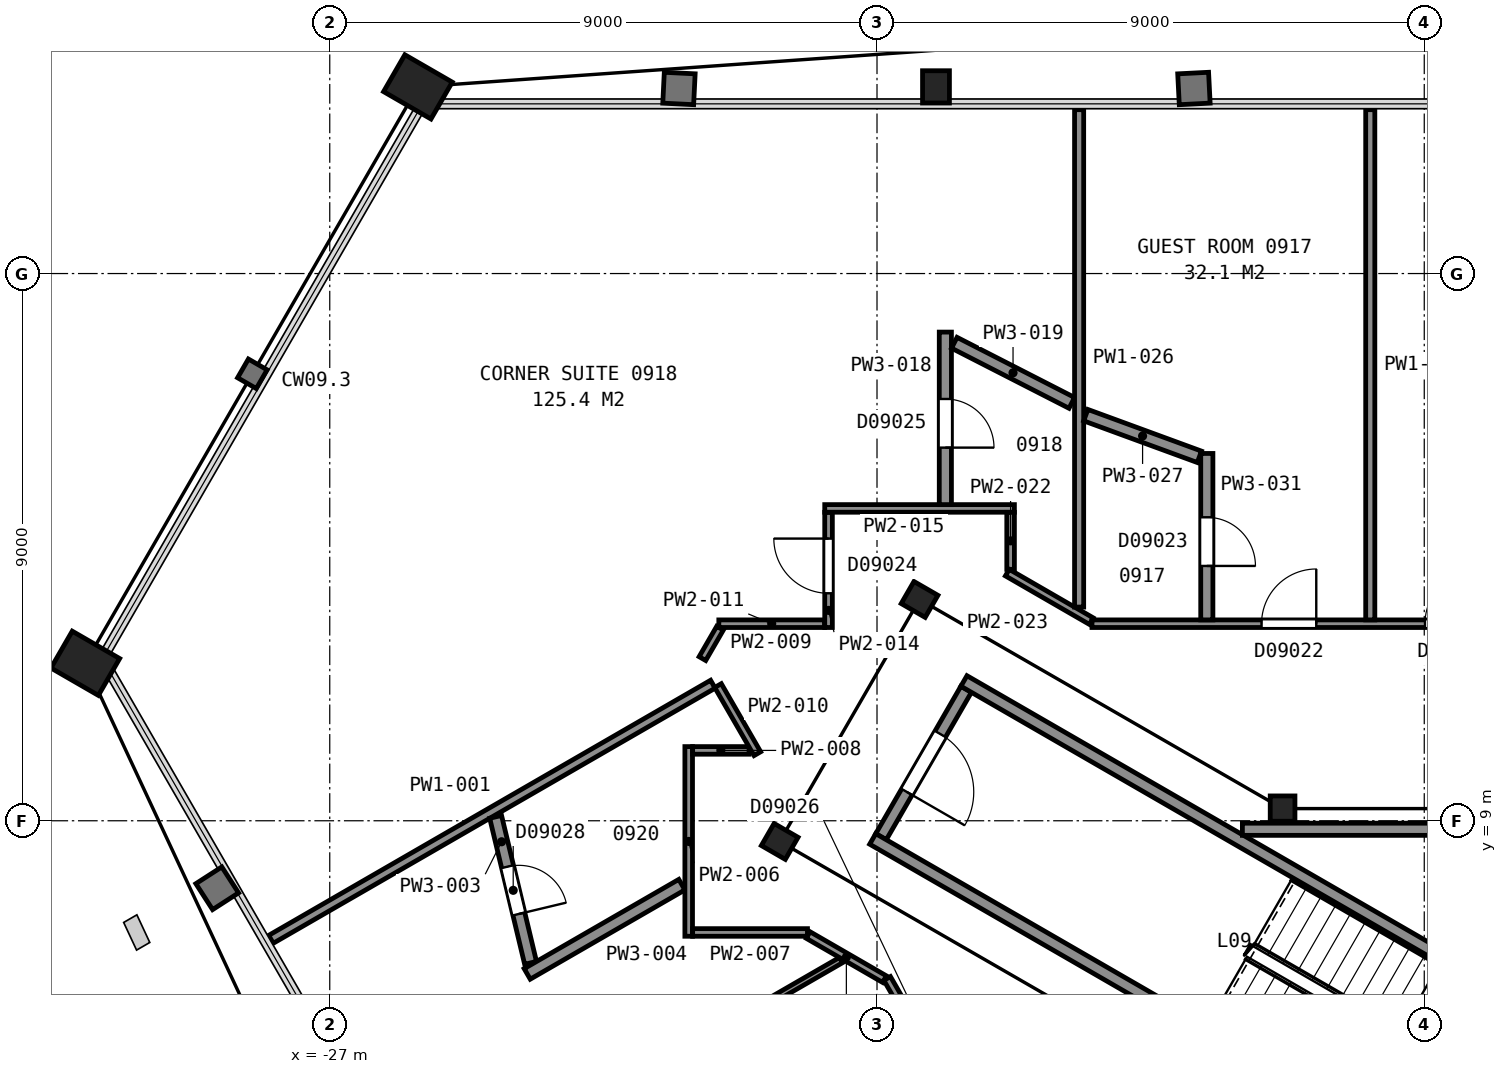
"""IFC4 building model, lengths in metres.
Left out: names, types, materials, properties, quantities, classifications, styles, units other than length and angle.
Written with IfcOpenShell. Run it as: python <this file> out.ifc"""

import sys

from ifc_helpers import new_model, si_unit, direction, frame, frame_2d, origin, origin_2d, place, context, subcontext, project, spatial, rectangle, hollow_rectangle, i_section, extrude, element, fill, save


model = new_model("IFC4")
c1 = context("Model", 3, precision=1e-05, world=origin(), true_north=direction((0.0, 1.0)))
c2 = subcontext(c1, "Body", "Model", "MODEL_VIEW")
j1 = project(units=[si_unit("LENGTHUNIT", "METRE"), si_unit("PLANEANGLEUNIT", "RADIAN")], contexts=[c1])
p1 = place(None, origin())
s1 = spatial("IfcSite", under=j1, at=p1, CompositionType="ELEMENT")
p2 = place(p1, origin())
s2 = spatial("IfcBuilding", under=s1, at=p2, CompositionType="ELEMENT")
p3 = place(p2, frame((0.0, 0.0, 47.6)))
s3 = spatial("IfcBuildingStorey", under=s2, at=p3, CompositionType="ELEMENT", Elevation=47.6)
p4 = place(p3, frame((-17.03, 21.07, 0.025), z_axis=(0.0, 0.0, 1.0), x_axis=(1.0, 0.0, 0.0)))
e1 = element("IfcColumn", 1, at=p4, inside=s3, PredefinedType="COLUMN", context=c2, shape_type="SweptSolid", body=[
    extrude(i_section(OverallWidth=0.442, OverallDepth=0.531, WebThickness=0.066, FlangeThickness=0.106, FilletRadius=0.015, at=origin_2d()), origin(), (0.0, 0.0, 1.0), 3.575),
])
for number, where, z_axis, x_axis in (
    (2, (-25.55, 21.07, 0.04), (0.0, 0.0, 1.0), (0.5, 0.866, 0.0)),
    (3, (-31.02, 11.59, 0.04), (0.0, 0.0, 1.0), (0.5, 0.866, 0.0)),
):
    element("IfcColumn", number, at=place(p3, frame(where, z_axis=z_axis, x_axis=x_axis)), inside=s3, PredefinedType="COLUMN", context=c2, shape_type="SweptSolid", body=[
        extrude(hollow_rectangle(XDim=0.7, YDim=0.9, WallThickness=0.065, at=origin_2d()), origin(), (0.0, 0.0, 1.0), 3.56),
    ])
p5 = place(p3, frame((-11.33, 9.2, 0.0), z_axis=(0.0, 0.0, 1.0), x_axis=(1.0, 0.0, 0.0)))
e4 = element("IfcColumn", 4, at=p5, inside=s3, PredefinedType="COLUMN", context=c2, shape_type="SweptSolid", body=[
    extrude(i_section(OverallWidth=0.406, OverallDepth=0.417, WebThickness=0.03, FlangeThickness=0.048, FilletRadius=0.015, at=origin_2d()), origin(), (0.0, 0.0, 1.0), 3.6),
])
for number, where, z_axis, x_axis in (
    (5, (-17.3, 12.64, 0.0), (0.0, 0.0, 1.0), (0.5, 0.866, 0.0)),
    (6, (-19.6, 8.66, 0.0), (0.0, 0.0, 1.0), (0.5, 0.866, 0.0)),
):
    element("IfcColumn", number, at=place(p3, frame(where, z_axis=z_axis, x_axis=x_axis)), inside=s3, PredefinedType="COLUMN", context=c2, shape_type="SweptSolid", body=[
        extrude(i_section(OverallWidth=0.419, OverallDepth=0.455, WebThickness=0.042, FlangeThickness=0.068, FilletRadius=0.015, at=origin_2d()), origin(), (0.0, 0.0, 1.0), 3.6),
    ])
p6 = place(p3, frame((-16.534, 11.162, 0.0), z_axis=(0.0, 0.0, 1.0), x_axis=(-0.49998411664, -0.866034573852, 0.0)))
e7 = element("IfcWall", 7, at=p6, inside=s3, PredefinedType="PARTITIONING", context=c2, shape_type="SweptSolid", body=[
    extrude(rectangle(XDim=2.8, YDim=0.2, at=frame_2d((1.4, 0.0))), origin(), (0.0, 0.0, 1.0), 3.35),
])
p7 = place(p6, frame((0.85, 0.0, 0.0)))
e8 = element("IfcOpeningElement", 8, at=p7, cuts=e7, PredefinedType="OPENING", context=c2, shape_type="SweptSolid", body=[
    extrude(rectangle(XDim=1.1, YDim=2.1, at=frame_2d((0.55, 1.05))), frame((0.0, 0.11, 0.0), z_axis=(0.0, -1.0, 0.0), x_axis=(1.0, 0.0, 0.0)), (0.0, 0.0, 1.0), 0.22),
])
for number, where, z_axis, x_axis in (
    (9, (-7.678, 2.701, 0.0), (0.0, 0.0, 1.0), (-0.866, 0.5, 0.0)),
    (10, (-6.178, 5.299, 0.0), (0.0, 0.0, 1.0), (-0.866, 0.5, 0.0)),
):
    element("IfcWall", number, at=place(p3, frame(where, z_axis=z_axis, x_axis=x_axis)), inside=s3, PredefinedType="PARTITIONING", context=c2, shape_type="SweptSolid", body=[
        extrude(rectangle(XDim=12.0, YDim=0.2, at=frame_2d((6.0, 0.0))), origin(), (0.0, 0.0, 1.0), 3.35),
    ])
p8 = place(p3, frame((0.263, 8.86, 0.0), z_axis=(0.0, 0.0, 1.0), x_axis=(-1.0, 0.0, 0.0)))
e11 = element("IfcWall", 11, at=p8, inside=s3, PredefinedType="PARTITIONING", context=c2, shape_type="SweptSolid", body=[
    extrude(rectangle(XDim=12.254, YDim=0.2, at=frame_2d((6.127, 0.0))), origin(), (0.0, 0.0, 1.0), 3.35),
])
p9 = place(p8, frame((5.709, 0.0, 0.0)))
e12 = element("IfcOpeningElement", 12, at=p9, cuts=e11, PredefinedType="OPENING", context=c2, shape_type="SweptSolid", body=[
    extrude(rectangle(XDim=1.8, YDim=2.1, at=frame_2d((0.9, 1.05))), frame((0.0, 0.11, 0.0), z_axis=(0.0, -1.0, 0.0), x_axis=(1.0, 0.0, 0.0)), (0.0, 0.0, 1.0), 0.22),
])
p10 = place(p3, frame((-27.967, 7.05, 0.0), z_axis=(0.0, 0.0, 1.0), x_axis=(0.86603249375, 0.499987719618, 0.0)))
e13 = element("IfcWall", 13, at=p10, inside=s3, PredefinedType="PARTITIONING", context=c2, shape_type="SweptSolid", body=[
    extrude(rectangle(XDim=8.392, YDim=0.15, at=frame_2d((4.196, 0.0))), origin(), (0.0, 0.0, 1.0), 2.613),
])
p11 = place(p3, frame((-25.476, 2.735, 0.0), z_axis=(0.0, 0.0, 1.0), x_axis=(0.866077639848, 0.499909513568, 0.0)))
e14 = element("IfcWall", 14, at=p11, inside=s3, PredefinedType="PARTITIONING", context=c2, shape_type="SweptSolid", body=[
    extrude(rectangle(XDim=7.946, YDim=0.1, at=frame_2d((3.973, 0.0))), origin(), (0.0, 0.0, 1.0), 2.613),
])
p12 = place(p11, frame((3.604, 0.0, 0.0)))
e15 = element("IfcOpeningElement", 15, at=p12, cuts=e14, PredefinedType="OPENING", context=c2, shape_type="SweptSolid", body=[
    extrude(rectangle(XDim=0.9, YDim=2.1, at=frame_2d((0.45, 1.05))), frame((0.0, 0.06, 0.0), z_axis=(0.0, -1.0, 0.0), x_axis=(1.0, 0.0, 0.0)), (0.0, 0.0, 1.0), 0.12),
])
p13 = place(p3, frame((-24.272, 9.064, 0.0), z_axis=(0.0, 0.0, 1.0), x_axis=(0.232636237171, -0.972563818551, 0.0)))
e16 = element("IfcWall", 16, at=p13, inside=s3, PredefinedType="PARTITIONING", context=c2, shape_type="SweptSolid", body=[
    extrude(rectangle(XDim=2.469, YDim=0.2, at=frame_2d((1.235, 0.0))), origin(), (0.0, 0.0, 1.0), 2.613),
])
p14 = place(p13, frame((0.842, 0.0, 0.0)))
e17 = element("IfcOpeningElement", 17, at=p14, cuts=e16, PredefinedType="OPENING", context=c2, shape_type="SweptSolid", body=[
    extrude(rectangle(XDim=0.8, YDim=2.1, at=frame_2d((0.4, 1.05))), frame((0.0, 0.11, 0.0), z_axis=(0.0, -1.0, 0.0), x_axis=(1.0, 0.0, 0.0)), (0.0, 0.0, 1.0), 0.22),
])
p15 = place(p3, frame((-23.753, 6.481, 0.0), z_axis=(0.0, 0.0, 1.0), x_axis=(0.866070680301, 0.499921570572, 0.0)))
e18 = element("IfcWall", 18, at=p15, inside=s3, PredefinedType="PARTITIONING", context=c2, shape_type="SweptSolid", body=[
    extrude(rectangle(XDim=2.937, YDim=0.2, at=frame_2d((1.468, 0.0))), origin(), (0.0, 0.0, 1.0), 2.613),
])
p16 = place(p3, frame((-21.097, 7.101, 0.0), z_axis=(0.0, 0.0, 1.0), x_axis=(0.0, 1.0, 0.0)))
e19 = element("IfcWall", 19, at=p16, inside=s3, PredefinedType="PARTITIONING", context=c2, shape_type="SweptSolid", body=[
    extrude(rectangle(XDim=3.119, YDim=0.125, at=frame_2d((1.56, 0.0))), origin(), (0.0, 0.0, 1.0), 2.613),
])
p17 = place(p3, frame((-21.032, 7.163, 0.0), z_axis=(0.0, 0.0, 1.0), x_axis=(1.0, 0.0, 0.0)))
e20 = element("IfcWall", 20, at=p17, inside=s3, PredefinedType="PARTITIONING", context=c2, shape_type="SweptSolid", body=[
    extrude(rectangle(XDim=1.888, YDim=0.125, at=frame_2d((0.944, 0.0))), origin(), (0.0, 0.0, 1.0), 2.613),
])
p18 = place(p3, frame((-21.032, 10.157, 0.0), z_axis=(0.0, 0.0, 1.0), x_axis=(1.0, 0.0, 0.0)))
e21 = element("IfcWall", 21, at=p18, inside=s3, PredefinedType="PARTITIONING", context=c2, shape_type="SweptSolid", body=[
    extrude(rectangle(XDim=0.928, YDim=0.125, at=frame_2d((0.464, 0.0))), origin(), (0.0, 0.0, 1.0), 2.613),
])
p19 = place(p3, frame((-20.871, 11.667, 0.0), z_axis=(0.0, 0.0, 1.0), x_axis=(0.500769941337, 0.865580421367, 0.0)))
e22 = element("IfcWall", 22, at=p19, inside=s3, PredefinedType="PARTITIONING", context=c2, shape_type="SweptSolid", body=[
    extrude(rectangle(XDim=0.578, YDim=0.125, at=frame_2d((0.289, 0.0))), origin(), (0.0, 0.0, 1.0), 2.613),
])
p20 = place(p3, frame((-20.615, 11.223, 0.0), z_axis=(0.0, 0.0, 1.0), x_axis=(0.500076370288, -0.865981306888, 0.0)))
e23 = element("IfcWall", 23, at=p20, inside=s3, PredefinedType="PARTITIONING", context=c2, shape_type="SweptSolid", body=[
    extrude(rectangle(XDim=1.294, YDim=0.125, at=frame_2d((0.647, 0.0))), origin(), (0.0, 0.0, 1.0), 2.613),
])
p21 = place(p3, frame((-20.602, 12.241, 0.0), z_axis=(0.0, 0.0, 1.0), x_axis=(1.0, 0.0, 0.0)))
e24 = element("IfcWall", 24, at=p21, inside=s3, PredefinedType="PARTITIONING", context=c2, shape_type="SweptSolid", body=[
    extrude(rectangle(XDim=1.74, YDim=0.125, at=frame_2d((0.87, 0.0))), origin(), (0.0, 0.0, 1.0), 2.613),
])
p22 = place(p3, frame((-19.132, 7.121, 0.0), z_axis=(0.0, 0.0, 1.0), x_axis=(0.865894215669, -0.500227155672, 0.0)))
e25 = element("IfcWall", 25, at=p22, inside=s3, PredefinedType="PARTITIONING", context=c2, shape_type="SweptSolid", body=[
    extrude(rectangle(XDim=1.451, YDim=0.125, at=frame_2d((0.726, 0.0))), origin(), (0.0, 0.0, 1.0), 2.613),
])
p23 = place(p3, frame((-18.797, 12.178, 0.0), z_axis=(0.0, 0.0, 1.0), x_axis=(0.0, 1.0, 0.0)))
e26 = element("IfcWall", 26, at=p23, inside=s3, PredefinedType="PARTITIONING", context=c2, shape_type="SweptSolid", body=[
    extrude(rectangle(XDim=1.894, YDim=0.125, at=frame_2d((0.947, 0.0))), origin(), (0.0, 0.0, 1.0), 2.613),
])
p24 = place(p23, frame((0.562, 0.0, 0.0)))
e27 = element("IfcOpeningElement", 27, at=p24, cuts=e26, PredefinedType="OPENING", context=c2, shape_type="SweptSolid", body=[
    extrude(rectangle(XDim=0.9, YDim=2.1, at=frame_2d((0.45, 1.05))), frame((0.0, 0.073, 0.0), z_axis=(0.0, -1.0, 0.0), x_axis=(1.0, 0.0, 0.0)), (0.0, 0.0, 1.0), 0.145),
])
p25 = place(p3, frame((-18.86, 14.137, 0.0), z_axis=(0.0, 0.0, 1.0), x_axis=(1.0, 0.0, 0.0)))
e28 = element("IfcWall", 28, at=p25, inside=s3, PredefinedType="PARTITIONING", context=c2, shape_type="SweptSolid", body=[
    extrude(rectangle(XDim=3.119, YDim=0.125, at=frame_2d((1.56, 0.0))), origin(), (0.0, 0.0, 1.0), 2.613),
])
p26 = place(p3, frame((-3.766, -17.959, 0.0), z_axis=(0.0, 0.0, 1.0), x_axis=(-0.500002884005, 0.866023738697, 0.0)))
e29 = element("IfcWall", 29, at=p26, inside=s3, PredefinedType="PARTITIONING", context=c2, shape_type="SweptSolid", body=[
    extrude(rectangle(XDim=28.135, YDim=0.125, at=frame_2d((14.067, 0.0))), origin(), (0.0, 0.0, 1.0), 2.613),
])
p27 = place(p26, frame((25.422, 0.0, 0.0)))
e30 = element("IfcOpeningElement", 30, at=p27, cuts=e29, PredefinedType="OPENING", context=c2, shape_type="SweptSolid", body=[
    extrude(rectangle(XDim=1.0, YDim=2.1, at=frame_2d((0.5, 1.05))), frame((0.0, 0.073, 0.0), z_axis=(0.0, -1.0, 0.0), x_axis=(1.0, 0.0, 0.0)), (0.0, 0.0, 1.0), 0.145),
])
p28 = place(p26, frame((21.693, 0.0, 0.0)))
e31 = element("IfcOpeningElement", 31, at=p28, cuts=e29, PredefinedType="OPENING", context=c2, shape_type="SweptSolid", body=[
    extrude(rectangle(XDim=0.9, YDim=2.1, at=frame_2d((0.45, 1.05))), frame((0.0, 0.073, 0.0), z_axis=(0.0, -1.0, 0.0), x_axis=(1.0, 0.0, 0.0)), (0.0, 0.0, 1.0), 0.145),
])
p29 = place(p26, frame((14.438, 0.0, 0.0)))
e32 = element("IfcOpeningElement", 32, at=p29, cuts=e29, PredefinedType="OPENING", context=c2, shape_type="SweptSolid", body=[
    extrude(rectangle(XDim=0.9, YDim=2.1, at=frame_2d((0.45, 1.05))), frame((0.0, 0.073, 0.0), z_axis=(0.0, -1.0, 0.0), x_axis=(1.0, 0.0, 0.0)), (0.0, 0.0, 1.0), 0.145),
])
p30 = place(p26, frame((11.712, 0.0, 0.0)))
e33 = element("IfcOpeningElement", 33, at=p30, cuts=e29, PredefinedType="OPENING", context=c2, shape_type="SweptSolid", body=[
    extrude(rectangle(XDim=0.9, YDim=2.1, at=frame_2d((0.45, 1.05))), frame((0.0, 0.073, 0.0), z_axis=(0.0, -1.0, 0.0), x_axis=(1.0, 0.0, 0.0)), (0.0, 0.0, 1.0), 0.145),
])
p31 = place(p26, frame((4.787, 0.0, 0.0)))
e34 = element("IfcOpeningElement", 34, at=p31, cuts=e29, PredefinedType="OPENING", context=c2, shape_type="SweptSolid", body=[
    extrude(rectangle(XDim=0.9, YDim=2.1, at=frame_2d((0.45, 1.05))), frame((0.0, 0.073, 0.0), z_axis=(0.0, -1.0, 0.0), x_axis=(1.0, 0.0, 0.0)), (0.0, 0.0, 1.0), 0.145),
])
p32 = place(p26, frame((1.762, 0.0, 0.0)))
e35 = element("IfcOpeningElement", 35, at=p32, cuts=e29, PredefinedType="OPENING", context=c2, shape_type="SweptSolid", body=[
    extrude(rectangle(XDim=0.9, YDim=2.1, at=frame_2d((0.45, 1.05))), frame((0.0, 0.073, 0.0), z_axis=(0.0, -1.0, 0.0), x_axis=(1.0, 0.0, 0.0)), (0.0, 0.0, 1.0), 0.145),
])
p33 = place(p3, frame((-16.876, 17.037, 0.0), z_axis=(0.0, 0.0, 1.0), x_axis=(0.0, -1.0, 0.0)))
e36 = element("IfcWall", 36, at=p33, inside=s3, PredefinedType="PARTITIONING", context=c2, shape_type="SweptSolid", body=[
    extrude(rectangle(XDim=2.838, YDim=0.2, at=frame_2d((1.419, 0.0))), origin(), (0.0, 0.0, 1.0), 2.613),
])
p34 = place(p33, frame((1.1, 0.0, 0.0)))
e37 = element("IfcOpeningElement", 37, at=p34, cuts=e36, PredefinedType="OPENING", context=c2, shape_type="SweptSolid", body=[
    extrude(rectangle(XDim=0.8, YDim=2.1, at=frame_2d((0.4, 1.05))), frame((0.0, 0.11, 0.0), z_axis=(0.0, -1.0, 0.0), x_axis=(1.0, 0.0, 0.0)), (0.0, 0.0, 1.0), 0.22),
])
p35 = place(p3, frame((-16.729, 16.862, 0.0), z_axis=(0.0, 0.0, 1.0), x_axis=(0.890181338078, -0.455606392995, 0.0)))
e38 = element("IfcWall", 38, at=p35, inside=s3, PredefinedType="PARTITIONING", context=c2, shape_type="SweptSolid", body=[
    extrude(rectangle(XDim=2.171, YDim=0.2, at=frame_2d((1.085, 0.0))), origin(), (0.0, 0.0, 1.0), 2.613),
])
p36 = place(p3, frame((-15.803, 13.135, 0.0), z_axis=(0.0, 0.0, 1.0), x_axis=(0.0, 1.0, 0.0)))
e39 = element("IfcWall", 39, at=p36, inside=s3, PredefinedType="PARTITIONING", context=c2, shape_type="SweptSolid", body=[
    extrude(rectangle(XDim=0.937, YDim=0.125, at=frame_2d((0.469, 0.0))), origin(), (0.0, 0.0, 1.0), 2.613),
])
p37 = place(p3, frame((-15.857, 13.081, 0.0), z_axis=(0.0, 0.0, 1.0), x_axis=(0.865974057503, -0.500088923824, 0.0)))
e40 = element("IfcWall", 40, at=p37, inside=s3, PredefinedType="PARTITIONING", context=c2, shape_type="SweptSolid", body=[
    extrude(rectangle(XDim=1.595, YDim=0.125, at=frame_2d((0.798, 0.0))), origin(), (0.0, 0.0, 1.0), 2.613),
])
p38 = place(p3, frame((-14.676, 12.514, 0.0), z_axis=(0.0, 0.0, 1.0), x_axis=(0.0, 1.0, 0.0)))
e41 = element("IfcWall", 41, at=p38, inside=s3, PredefinedType="PARTITIONING", context=c2, shape_type="SweptSolid", body=[
    extrude(rectangle(XDim=8.181, YDim=0.15, at=frame_2d((4.09, 0.0))), origin(), (0.0, 0.0, 1.0), 2.613),
])
p39 = place(p3, frame((-14.567, 15.671, 0.0), z_axis=(0.0, 0.0, 1.0), x_axis=(0.938894816734, -0.344204188105, 0.0)))
e42 = element("IfcWall", 42, at=p39, inside=s3, PredefinedType="PARTITIONING", context=c2, shape_type="SweptSolid", body=[
    extrude(rectangle(XDim=1.99, YDim=0.2, at=frame_2d((0.995, 0.0))), origin(), (0.0, 0.0, 1.0), 2.613),
])
p40 = place(p3, frame((-14.465, 12.241, 0.0), z_axis=(0.0, 0.0, 1.0), x_axis=(1.0, 0.0, 0.0)))
e43 = element("IfcWall", 43, at=p40, inside=s3, PredefinedType="PARTITIONING", context=c2, shape_type="SweptSolid", body=[
    extrude(rectangle(XDim=28.929, YDim=0.125, at=frame_2d((14.465, 0.0))), origin(), (0.0, 0.0, 1.0), 2.613),
])
p41 = place(p40, frame((25.252, 0.0, 0.0)))
e44 = element("IfcOpeningElement", 44, at=p41, cuts=e43, PredefinedType="OPENING", context=c2, shape_type="SweptSolid", body=[
    extrude(rectangle(XDim=0.9, YDim=2.1, at=frame_2d((0.45, 1.05))), frame((0.0, 0.073, 0.0), z_axis=(0.0, -1.0, 0.0), x_axis=(1.0, 0.0, 0.0)), (0.0, 0.0, 1.0), 0.145),
])
p42 = place(p40, frame((22.564, 0.0, 0.0)))
e45 = element("IfcOpeningElement", 45, at=p42, cuts=e43, PredefinedType="OPENING", context=c2, shape_type="SweptSolid", body=[
    extrude(rectangle(XDim=0.9, YDim=2.1, at=frame_2d((0.45, 1.05))), frame((0.0, 0.073, 0.0), z_axis=(0.0, -1.0, 0.0), x_axis=(1.0, 0.0, 0.0)), (0.0, 0.0, 1.0), 0.145),
])
p43 = place(p40, frame((15.302, 0.0, 0.0)))
e46 = element("IfcOpeningElement", 46, at=p43, cuts=e43, PredefinedType="OPENING", context=c2, shape_type="SweptSolid", body=[
    extrude(rectangle(XDim=0.9, YDim=2.1, at=frame_2d((0.45, 1.05))), frame((0.0, 0.073, 0.0), z_axis=(0.0, -1.0, 0.0), x_axis=(1.0, 0.0, 0.0)), (0.0, 0.0, 1.0), 0.145),
])
p44 = place(p40, frame((12.365, 0.0, 0.0)))
e47 = element("IfcOpeningElement", 47, at=p44, cuts=e43, PredefinedType="OPENING", context=c2, shape_type="SweptSolid", body=[
    extrude(rectangle(XDim=0.9, YDim=2.1, at=frame_2d((0.45, 1.05))), frame((0.0, 0.073, 0.0), z_axis=(0.0, -1.0, 0.0), x_axis=(1.0, 0.0, 0.0)), (0.0, 0.0, 1.0), 0.145),
])
p45 = place(p40, frame((5.477, 0.0, 0.0)))
e48 = element("IfcOpeningElement", 48, at=p45, cuts=e43, PredefinedType="OPENING", context=c2, shape_type="SweptSolid", body=[
    extrude(rectangle(XDim=0.9, YDim=2.1, at=frame_2d((0.45, 1.05))), frame((0.0, 0.073, 0.0), z_axis=(0.0, -1.0, 0.0), x_axis=(1.0, 0.0, 0.0)), (0.0, 0.0, 1.0), 0.145),
])
p46 = place(p40, frame((2.789, 0.0, 0.0)))
e49 = element("IfcOpeningElement", 49, at=p46, cuts=e43, PredefinedType="OPENING", context=c2, shape_type="SweptSolid", body=[
    extrude(rectangle(XDim=0.9, YDim=2.1, at=frame_2d((0.45, 1.05))), frame((0.0, 0.073, 0.0), z_axis=(0.0, -1.0, 0.0), x_axis=(1.0, 0.0, 0.0)), (0.0, 0.0, 1.0), 0.145),
])
p47 = place(p3, frame((-12.576, 12.303, 0.0), z_axis=(0.0, 0.0, 1.0), x_axis=(0.0, 1.0, 0.0)))
e50 = element("IfcWall", 50, at=p47, inside=s3, PredefinedType="PARTITIONING", context=c2, shape_type="SweptSolid", body=[
    extrude(rectangle(XDim=2.738, YDim=0.2, at=frame_2d((1.369, 0.0))), origin(), (0.0, 0.0, 1.0), 2.613),
])
p48 = place(p47, frame((0.887, 0.0, 0.0)))
e51 = element("IfcOpeningElement", 51, at=p48, cuts=e50, PredefinedType="OPENING", context=c2, shape_type="SweptSolid", body=[
    extrude(rectangle(XDim=0.8, YDim=2.1, at=frame_2d((0.4, 1.05))), frame((0.0, 0.11, 0.0), z_axis=(0.0, -1.0, 0.0), x_axis=(1.0, 0.0, 0.0)), (0.0, 0.0, 1.0), 0.22),
])
p49 = place(p3, frame((-9.888, 12.303, 0.0), z_axis=(0.0, 0.0, 1.0), x_axis=(0.0, 1.0, 0.0)))
e52 = element("IfcWall", 52, at=p49, inside=s3, PredefinedType="PARTITIONING", context=c2, shape_type="SweptSolid", body=[
    extrude(rectangle(XDim=8.392, YDim=0.15, at=frame_2d((4.196, 0.0))), origin(), (0.0, 0.0, 1.0), 2.613),
])
p50 = place(p7, origin())
e53 = element("IfcDoor", 53, at=p50, inside=s3, OperationType="SINGLE_SWING_RIGHT", PredefinedType="DOOR", context=c2, shape_type="SweptSolid", body=[
    extrude(rectangle(XDim=1.1, YDim=2.1, at=frame_2d((0.55, 1.05))), frame((0.0, 0.025, 0.0), z_axis=(0.0, -1.0, 0.0), x_axis=(1.0, 0.0, 0.0)), (0.0, 0.0, 1.0), 0.05),
])
fill(e8, e53)
p51 = place(p14, origin())
e54 = element("IfcDoor", 54, at=p51, inside=s3, OperationType="SINGLE_SWING_RIGHT", PredefinedType="DOOR", context=c2, shape_type="SweptSolid", body=[
    extrude(rectangle(XDim=0.8, YDim=2.1, at=frame_2d((0.4, 1.05))), frame((0.0, 0.025, 0.0), z_axis=(0.0, -1.0, 0.0), x_axis=(1.0, 0.0, 0.0)), (0.0, 0.0, 1.0), 0.05),
])
fill(e17, e54)
p52 = place(p24, origin())
e55 = element("IfcDoor", 55, at=p52, inside=s3, OperationType="SINGLE_SWING_RIGHT", PredefinedType="DOOR", context=c2, shape_type="SweptSolid", body=[
    extrude(rectangle(XDim=0.9, YDim=2.1, at=frame_2d((0.45, 1.05))), frame((0.0, 0.025, 0.0), z_axis=(0.0, -1.0, 0.0), x_axis=(1.0, 0.0, 0.0)), (0.0, 0.0, 1.0), 0.05),
])
fill(e27, e55)
p53 = place(p34, origin())
e56 = element("IfcDoor", 56, at=p53, inside=s3, OperationType="SINGLE_SWING_RIGHT", PredefinedType="DOOR", context=c2, shape_type="SweptSolid", body=[
    extrude(rectangle(XDim=0.8, YDim=2.1, at=frame_2d((0.4, 1.05))), frame((0.0, 0.025, 0.0), z_axis=(0.0, -1.0, 0.0), x_axis=(1.0, 0.0, 0.0)), (0.0, 0.0, 1.0), 0.05),
])
fill(e37, e56)
p54 = place(p45, origin())
e57 = element("IfcDoor", 57, at=p54, inside=s3, OperationType="SINGLE_SWING_RIGHT", PredefinedType="DOOR", context=c2, shape_type="SweptSolid", body=[
    extrude(rectangle(XDim=0.9, YDim=2.1, at=frame_2d((0.45, 1.05))), frame((0.0, 0.025, 0.0), z_axis=(0.0, -1.0, 0.0), x_axis=(1.0, 0.0, 0.0)), (0.0, 0.0, 1.0), 0.05),
])
fill(e48, e57)
p55 = place(p46, origin())
e58 = element("IfcDoor", 58, at=p55, inside=s3, OperationType="SINGLE_SWING_RIGHT", PredefinedType="DOOR", context=c2, shape_type="SweptSolid", body=[
    extrude(rectangle(XDim=0.9, YDim=2.1, at=frame_2d((0.45, 1.05))), frame((0.0, 0.025, 0.0), z_axis=(0.0, -1.0, 0.0), x_axis=(1.0, 0.0, 0.0)), (0.0, 0.0, 1.0), 0.05),
])
fill(e49, e58)
p56 = place(p48, origin())
e59 = element("IfcDoor", 59, at=p56, inside=s3, OperationType="SINGLE_SWING_LEFT", PredefinedType="DOOR", context=c2, shape_type="SweptSolid", body=[
    extrude(rectangle(XDim=0.8, YDim=2.1, at=frame_2d((0.4, 1.05))), frame((0.0, 0.025, 0.0), z_axis=(0.0, -1.0, 0.0), x_axis=(1.0, 0.0, 0.0)), (0.0, 0.0, 1.0), 0.05),
])
fill(e51, e59)
save(model, sys.argv[1])
